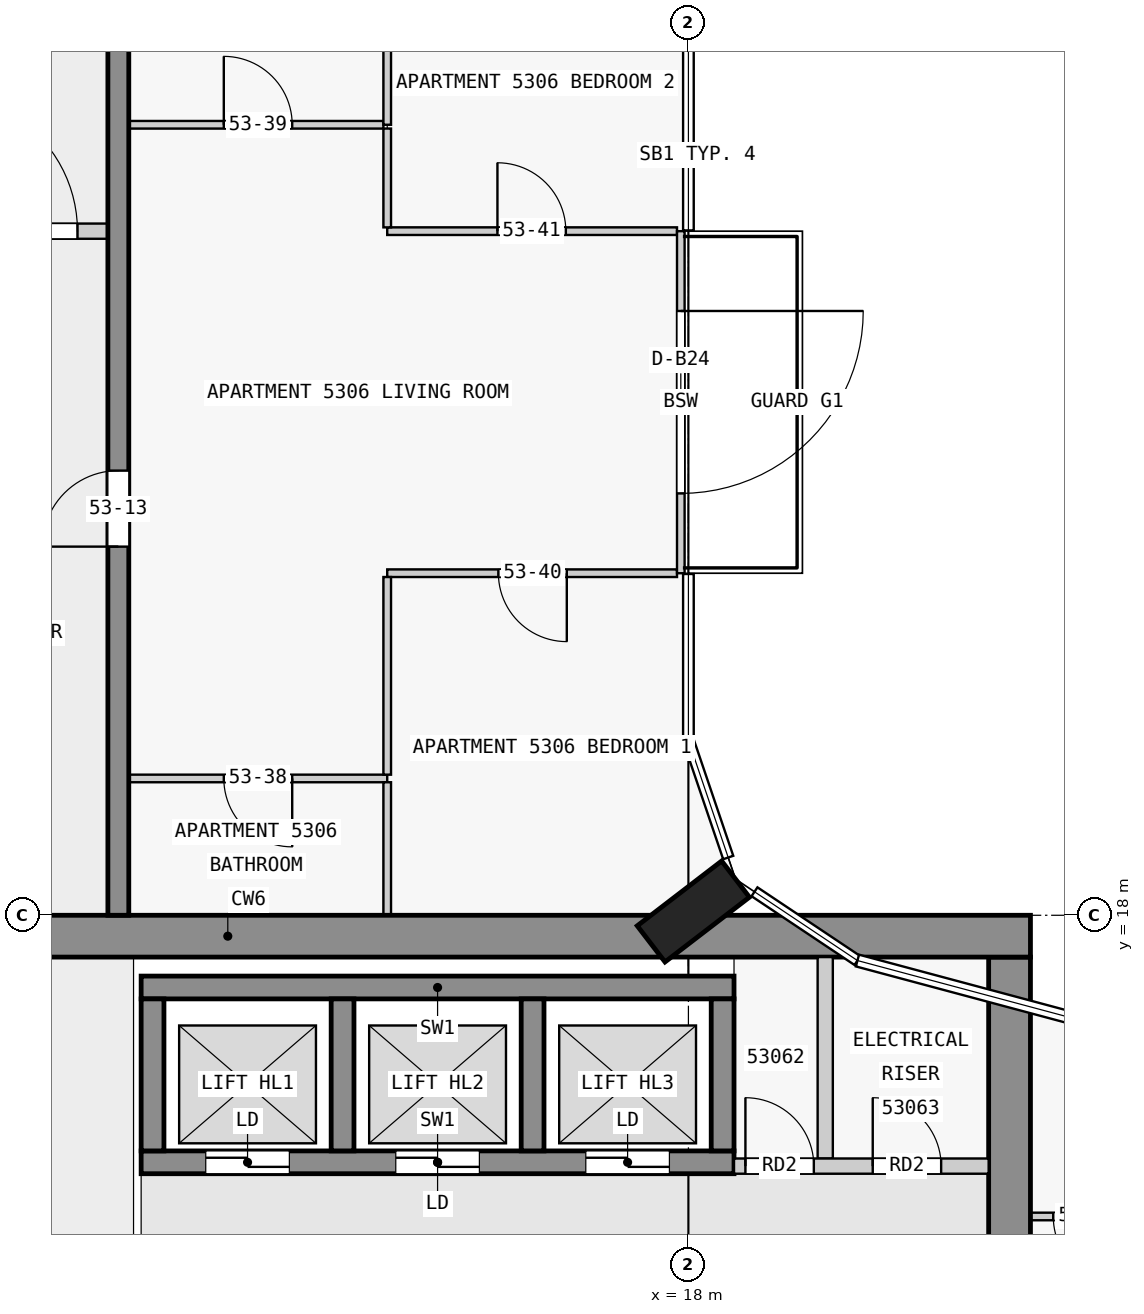
"""IFC4 building model, lengths in metres.
Left out: names, types, materials, properties, quantities, classifications, styles, units other than length and angle.
Written with IfcOpenShell. Run it as: python <this file> out.ifc"""

import sys

from ifc_helpers import new_model, si_unit, direction, frame, frame_2d, origin, origin_2d, place, context, subcontext, project, spatial, rectangle, extrude, element, fill, save


model = new_model("IFC4")
c1 = context("Model", 3, precision=1e-05, world=origin(), true_north=direction((0.0, 1.0)))
c2 = subcontext(c1, "Body", "Model", "MODEL_VIEW")
j1 = project(units=[si_unit("LENGTHUNIT", "METRE"), si_unit("PLANEANGLEUNIT", "RADIAN")], contexts=[c1])
p1 = place(None, origin())
s1 = spatial("IfcSite", under=j1, at=p1, CompositionType="ELEMENT")
p2 = place(p1, origin())
s2 = spatial("IfcBuilding", under=s1, at=p2, CompositionType="ELEMENT")
p3 = place(p2, frame((0.0, 0.0, 204.9)))
s3 = spatial("IfcBuildingStorey", under=s2, at=p3, CompositionType="ELEMENT", Elevation=204.9)
p4 = place(p3, frame((18.065, 18.05, 0.0), z_axis=(0.0, 0.0, 1.0), x_axis=(-0.608810846443, 0.793315418515, 0.0)))
e1 = element("IfcColumn", 1, at=p4, inside=s3, PredefinedType="COLUMN", context=c2, shape_type="SweptSolid", body=[
    extrude(rectangle(XDim=0.6, YDim=1.4, at=origin_2d()), origin(), (0.0, 0.0, 1.0), 3.5),
])
p5 = place(p3, frame((1.38, 17.725, 0.0), z_axis=(0.0, 0.0, 1.0), x_axis=(1.0, 0.0, 0.0)))
e2 = element("IfcWall", 2, at=p5, inside=s3, PredefinedType="SHEAR", context=c2, shape_type="SweptSolid", body=[
    extrude(rectangle(XDim=21.12, YDim=0.55, at=frame_2d((10.56, 0.0))), origin(), (0.0, 0.0, 1.0), 3.25),
])
p6 = place(p5, frame((6.35, 0.0, 0.0)))
e3 = element("IfcOpeningElement", 3, at=p6, cuts=e2, PredefinedType="OPENING", context=c2, shape_type="SweptSolid", body=[
    extrude(rectangle(XDim=1.8, YDim=2.1, at=frame_2d((0.9, 1.05))), frame((0.0, 0.285, 0.0), z_axis=(0.0, -1.0, 0.0), x_axis=(1.0, 0.0, 0.0)), (0.0, 0.0, 1.0), 0.57),
])
p7 = place(p3, frame((22.225, 2.5, 0.0), z_axis=(0.0, 0.0, 1.0), x_axis=(0.0, 1.0, 0.0)))
e4 = element("IfcWall", 4, at=p7, inside=s3, PredefinedType="SHEAR", context=c2, shape_type="SweptSolid", body=[
    extrude(rectangle(XDim=14.95, YDim=0.55, at=frame_2d((7.475, 0.0))), origin(), (0.0, 0.0, 1.0), 3.25),
])
p8 = place(p7, frame((5.6, 0.0, 0.0)))
e5 = element("IfcOpeningElement", 5, at=p8, cuts=e4, PredefinedType="OPENING", context=c2, shape_type="SweptSolid", body=[
    extrude(rectangle(XDim=1.8, YDim=2.1, at=frame_2d((0.9, 1.05))), frame((0.0, 0.285, 0.0), z_axis=(0.0, -1.0, 0.0), x_axis=(1.0, 0.0, 0.0)), (0.0, 0.0, 1.0), 0.57),
])
p9 = place(p3, frame((10.8, 17.05, 0.0), z_axis=(0.0, 0.0, 1.0), x_axis=(1.0, 0.0, 0.0)))
e6 = element("IfcWall", 6, at=p9, inside=s3, PredefinedType="SHEAR", context=c2, shape_type="SweptSolid", body=[
    extrude(rectangle(XDim=7.8, YDim=0.3, at=frame_2d((3.9, 0.0))), origin(), (0.0, 0.0, 1.0), 3.25),
])
p10 = place(p3, frame((10.8, 14.75, 0.0), z_axis=(0.0, 0.0, 1.0), x_axis=(1.0, 0.0, 0.0)))
e7 = element("IfcWall", 7, at=p10, inside=s3, PredefinedType="SHEAR", context=c2, shape_type="SweptSolid", body=[
    extrude(rectangle(XDim=7.8, YDim=0.3, at=frame_2d((3.9, 0.0))), origin(), (0.0, 0.0, 1.0), 3.25),
])
p11 = place(p10, frame((0.85, 0.0, 0.0)))
e8 = element("IfcOpeningElement", 8, at=p11, cuts=e7, PredefinedType="OPENING", context=c2, shape_type="SweptSolid", body=[
    extrude(rectangle(XDim=1.1, YDim=2.1, at=frame_2d((0.55, 1.05))), frame((0.0, 0.16, 0.0), z_axis=(0.0, -1.0, 0.0), x_axis=(1.0, 0.0, 0.0)), (0.0, 0.0, 1.0), 0.32),
])
p12 = place(p10, frame((3.35, 0.0, 0.0)))
e9 = element("IfcOpeningElement", 9, at=p12, cuts=e7, PredefinedType="OPENING", context=c2, shape_type="SweptSolid", body=[
    extrude(rectangle(XDim=1.1, YDim=2.1, at=frame_2d((0.55, 1.05))), frame((0.0, 0.16, 0.0), z_axis=(0.0, -1.0, 0.0), x_axis=(1.0, 0.0, 0.0)), (0.0, 0.0, 1.0), 0.32),
])
p13 = place(p10, frame((5.85, 0.0, 0.0)))
e10 = element("IfcOpeningElement", 10, at=p13, cuts=e7, PredefinedType="OPENING", context=c2, shape_type="SweptSolid", body=[
    extrude(rectangle(XDim=1.1, YDim=2.1, at=frame_2d((0.55, 1.05))), frame((0.0, 0.16, 0.0), z_axis=(0.0, -1.0, 0.0), x_axis=(1.0, 0.0, 0.0)), (0.0, 0.0, 1.0), 0.32),
])
for number, where, z_axis, x_axis in (
    (11, (10.95, 14.9, 0.0), (0.0, 0.0, 1.0), (0.0, 1.0, 0.0)),
    (12, (13.45, 14.9, 0.0), (0.0, 0.0, 1.0), (0.0, 1.0, 0.0)),
    (13, (15.95, 14.9, 0.0), (0.0, 0.0, 1.0), (0.0, 1.0, 0.0)),
    (14, (18.45, 14.9, 0.0), (0.0, 0.0, 1.0), (0.0, 1.0, 0.0)),
):
    element("IfcWall", number, at=place(p3, frame(where, z_axis=z_axis, x_axis=x_axis)), inside=s3, PredefinedType="SHEAR", context=c2, shape_type="SweptSolid", body=[
        extrude(rectangle(XDim=2.0, YDim=0.3, at=frame_2d((1.0, 0.0))), origin(), (0.0, 0.0, 1.0), 3.25),
    ])
p14 = place(p3, frame((10.5, 18.0, 0.0), z_axis=(0.0, 0.0, 1.0), x_axis=(0.0, 1.0, 0.0)))
e15 = element("IfcWall", 15, at=p14, inside=s3, PredefinedType="SHEAR", context=c2, shape_type="SweptSolid", body=[
    extrude(rectangle(XDim=27.0, YDim=0.275, at=frame_2d((13.5, 0.0))), origin(), (0.0, 0.0, 1.0), 3.25),
])
p15 = place(p14, frame((4.85, 0.0, 0.0)))
e16 = element("IfcOpeningElement", 16, at=p15, cuts=e15, PredefinedType="OPENING", context=c2, shape_type="SweptSolid", body=[
    extrude(rectangle(XDim=1.0, YDim=2.1, at=frame_2d((0.5, 1.05))), frame((0.0, 0.147, 0.0), z_axis=(0.0, -1.0, 0.0), x_axis=(1.0, 0.0, 0.0)), (0.0, 0.0, 1.0), 0.295),
])
p16 = place(p14, frame((15.25, 0.0, 0.0)))
e17 = element("IfcOpeningElement", 17, at=p16, cuts=e15, PredefinedType="OPENING", context=c2, shape_type="SweptSolid", body=[
    extrude(rectangle(XDim=1.0, YDim=2.1, at=frame_2d((0.5, 1.05))), frame((0.0, 0.147, 0.0), z_axis=(0.0, -1.0, 0.0), x_axis=(1.0, 0.0, 0.0)), (0.0, 0.0, 1.0), 0.295),
])
p17 = place(p14, frame((21.35, 0.0, 0.0)))
e18 = element("IfcOpeningElement", 18, at=p17, cuts=e15, PredefinedType="OPENING", context=c2, shape_type="SweptSolid", body=[
    extrude(rectangle(XDim=1.0, YDim=2.1, at=frame_2d((0.5, 1.05))), frame((0.0, 0.147, 0.0), z_axis=(0.0, -1.0, 0.0), x_axis=(1.0, 0.0, 0.0)), (0.0, 0.0, 1.0), 0.295),
])
p18 = place(p3, frame((17.9, 27.0, 0.0), z_axis=(0.0, 0.0, 1.0), x_axis=(0.0, -1.0, 0.0)))
e19 = element("IfcWall", 19, at=p18, inside=s3, PredefinedType="STANDARD", context=c2, shape_type="SweptSolid", body=[
    extrude(rectangle(XDim=4.5, YDim=0.1, at=frame_2d((2.25, 0.0))), origin(), (0.0, 0.0, 1.0), 3.25),
])
p19 = place(p18, frame((1.05, 0.0, 0.0)))
e20 = element("IfcOpeningElement", 20, at=p19, cuts=e19, PredefinedType="OPENING", context=c2, shape_type="SweptSolid", body=[
    extrude(rectangle(XDim=2.4, YDim=2.4, at=frame_2d((1.2, 1.2))), frame((0.0, 0.06, 0.0), z_axis=(0.0, -1.0, 0.0), x_axis=(1.0, 0.0, 0.0)), (0.0, 0.0, 1.0), 0.12),
])
p20 = place(p3, frame((18.6, 14.7, 0.0), z_axis=(0.0, 0.0, 1.0), x_axis=(1.0, 0.0, 0.0)))
e21 = element("IfcWall", 21, at=p20, inside=s3, PredefinedType="PARTITIONING", context=c2, shape_type="SweptSolid", body=[
    extrude(rectangle(XDim=3.35, YDim=0.2, at=frame_2d((1.675, 0.0))), origin(), (0.0, 0.0, 1.0), 3.25),
])
p21 = place(p20, frame((0.15, 0.0, 0.0)))
e22 = element("IfcOpeningElement", 22, at=p21, cuts=e21, PredefinedType="OPENING", context=c2, shape_type="SweptSolid", body=[
    extrude(rectangle(XDim=0.9, YDim=2.1, at=frame_2d((0.45, 1.05))), frame((0.0, 0.11, 0.0), z_axis=(0.0, -1.0, 0.0), x_axis=(1.0, 0.0, 0.0)), (0.0, 0.0, 1.0), 0.22),
])
p22 = place(p20, frame((1.825, 0.0, 0.0)))
e23 = element("IfcOpeningElement", 23, at=p22, cuts=e21, PredefinedType="OPENING", context=c2, shape_type="SweptSolid", body=[
    extrude(rectangle(XDim=0.9, YDim=2.1, at=frame_2d((0.45, 1.05))), frame((0.0, 0.11, 0.0), z_axis=(0.0, -1.0, 0.0), x_axis=(1.0, 0.0, 0.0)), (0.0, 0.0, 1.0), 0.22),
])
p23 = place(p3, frame((19.8, 14.8, 0.0), z_axis=(0.0, 0.0, 1.0), x_axis=(0.0, 1.0, 0.0)))
e24 = element("IfcWall", 24, at=p23, inside=s3, PredefinedType="PARTITIONING", context=c2, shape_type="SweptSolid", body=[
    extrude(rectangle(XDim=2.65, YDim=0.2, at=frame_2d((1.325, 0.0))), origin(), (0.0, 0.0, 1.0), 3.25),
])
p24 = place(p3, frame((24.05, 14.038, 0.0), z_axis=(0.0, 0.0, 1.0), x_axis=(-1.0, 0.0, 0.0)))
e25 = element("IfcWall", 25, at=p24, inside=s3, PredefinedType="PARTITIONING", context=c2, shape_type="SweptSolid", body=[
    extrude(rectangle(XDim=1.55, YDim=0.1, at=frame_2d((0.775, 0.0))), origin(), (0.0, 0.0, 1.0), 3.25),
])
p25 = place(p24, frame((0.35, 0.0, 0.0)))
e26 = element("IfcOpeningElement", 26, at=p25, cuts=e25, PredefinedType="OPENING", context=c2, shape_type="SweptSolid", body=[
    extrude(rectangle(XDim=0.9, YDim=2.1, at=frame_2d((0.45, 1.05))), frame((0.0, 0.06, 0.0), z_axis=(0.0, -1.0, 0.0), x_axis=(1.0, 0.0, 0.0)), (0.0, 0.0, 1.0), 0.12),
])
p26 = place(p3, frame((14.038, 19.8, 0.0), z_axis=(0.0, 0.0, 1.0), x_axis=(-1.0, 0.0, 0.0)))
e27 = element("IfcWall", 27, at=p26, inside=s3, PredefinedType="PARTITIONING", context=c2, shape_type="SweptSolid", body=[
    extrude(rectangle(XDim=3.4, YDim=0.1, at=frame_2d((1.7, 0.0))), origin(), (0.0, 0.0, 1.0), 3.25),
])
p27 = place(p26, frame((1.25, 0.0, 0.0)))
e28 = element("IfcOpeningElement", 28, at=p27, cuts=e27, PredefinedType="OPENING", context=c2, shape_type="SweptSolid", body=[
    extrude(rectangle(XDim=0.9, YDim=2.1, at=frame_2d((0.45, 1.05))), frame((0.0, 0.06, 0.0), z_axis=(0.0, -1.0, 0.0), x_axis=(1.0, 0.0, 0.0)), (0.0, 0.0, 1.0), 0.12),
])
p28 = place(p3, frame((17.85, 22.5, 0.0), z_axis=(0.0, 0.0, 1.0), x_axis=(-1.0, 0.0, 0.0)))
e29 = element("IfcWall", 29, at=p28, inside=s3, PredefinedType="PARTITIONING", context=c2, shape_type="SweptSolid", body=[
    extrude(rectangle(XDim=3.812, YDim=0.1, at=frame_2d((1.906, 0.0))), origin(), (0.0, 0.0, 1.0), 3.25),
])
p29 = place(p28, frame((1.45, 0.0, 0.0)))
e30 = element("IfcOpeningElement", 30, at=p29, cuts=e29, PredefinedType="OPENING", context=c2, shape_type="SweptSolid", body=[
    extrude(rectangle(XDim=0.9, YDim=2.1, at=frame_2d((0.45, 1.05))), frame((0.0, 0.06, 0.0), z_axis=(0.0, -1.0, 0.0), x_axis=(1.0, 0.0, 0.0)), (0.0, 0.0, 1.0), 0.12),
])
p30 = place(p3, frame((14.038, 27.0, 0.0), z_axis=(0.0, 0.0, 1.0), x_axis=(1.0, 0.0, 0.0)))
e31 = element("IfcWall", 31, at=p30, inside=s3, PredefinedType="PARTITIONING", context=c2, shape_type="SweptSolid", body=[
    extrude(rectangle(XDim=3.812, YDim=0.1, at=frame_2d((1.906, 0.0))), origin(), (0.0, 0.0, 1.0), 3.25),
])
p31 = place(p30, frame((1.45, 0.0, 0.0)))
e32 = element("IfcOpeningElement", 32, at=p31, cuts=e31, PredefinedType="OPENING", context=c2, shape_type="SweptSolid", body=[
    extrude(rectangle(XDim=0.9, YDim=2.1, at=frame_2d((0.45, 1.05))), frame((0.0, 0.06, 0.0), z_axis=(0.0, -1.0, 0.0), x_axis=(1.0, 0.0, 0.0)), (0.0, 0.0, 1.0), 0.12),
])
p32 = place(p3, frame((10.637, 28.4, 0.0), z_axis=(0.0, 0.0, 1.0), x_axis=(1.0, 0.0, 0.0)))
e33 = element("IfcWall", 33, at=p32, inside=s3, PredefinedType="PARTITIONING", context=c2, shape_type="SweptSolid", body=[
    extrude(rectangle(XDim=3.35, YDim=0.1, at=frame_2d((1.675, 0.0))), origin(), (0.0, 0.0, 1.0), 3.25),
])
p33 = place(p32, frame((1.25, 0.0, 0.0)))
e34 = element("IfcOpeningElement", 34, at=p33, cuts=e33, PredefinedType="OPENING", context=c2, shape_type="SweptSolid", body=[
    extrude(rectangle(XDim=0.9, YDim=2.1, at=frame_2d((0.45, 1.05))), frame((0.0, 0.06, 0.0), z_axis=(0.0, -1.0, 0.0), x_axis=(1.0, 0.0, 0.0)), (0.0, 0.0, 1.0), 0.12),
])
p34 = place(p3, frame((14.038, 22.45, 0.0), z_axis=(0.0, 0.0, 1.0), x_axis=(0.0, -1.0, 0.0)))
e35 = element("IfcWall", 35, at=p34, inside=s3, PredefinedType="PARTITIONING", context=c2, shape_type="SweptSolid", body=[
    extrude(rectangle(XDim=2.6, YDim=0.1, at=frame_2d((1.3, 0.0))), origin(), (0.0, 0.0, 1.0), 3.25),
])
p35 = place(p3, frame((14.038, 28.35, 0.0), z_axis=(0.0, 0.0, 1.0), x_axis=(0.0, -1.0, 0.0)))
e36 = element("IfcWall", 36, at=p35, inside=s3, PredefinedType="PARTITIONING", context=c2, shape_type="SweptSolid", body=[
    extrude(rectangle(XDim=1.3, YDim=0.1, at=frame_2d((0.65, 0.0))), origin(), (0.0, 0.0, 1.0), 3.25),
])
p36 = place(p3, frame((14.038, 18.0, 0.0), z_axis=(0.0, 0.0, 1.0), x_axis=(0.0, 1.0, 0.0)))
e37 = element("IfcWall", 37, at=p36, inside=s3, PredefinedType="PARTITIONING", context=c2, shape_type="SweptSolid", body=[
    extrude(rectangle(XDim=1.75, YDim=0.1, at=frame_2d((0.875, 0.0))), origin(), (0.0, 0.0, 1.0), 3.25),
])
p37 = place(p3, frame((14.038, 28.4, 0.0), z_axis=(0.0, 0.0, 1.0), x_axis=(0.0, 1.0, 0.0)))
e38 = element("IfcWall", 38, at=p37, inside=s3, PredefinedType="PARTITIONING", context=c2, shape_type="SweptSolid", body=[
    extrude(rectangle(XDim=3.0, YDim=0.1, at=frame_2d((1.5, 0.0))), origin(), (0.0, 0.0, 1.0), 3.25),
])
p38 = place(p3, frame((7.462, 27.0, 0.0), z_axis=(0.0, 0.0, 1.0), x_axis=(1.0, 0.0, 0.0)))
e39 = element("IfcWall", 39, at=p38, inside=s3, PredefinedType="PARTITIONING", context=c2, shape_type="SweptSolid", body=[
    extrude(rectangle(XDim=3.175, YDim=0.2, at=frame_2d((1.587, 0.0))), origin(), (0.0, 0.0, 1.0), 3.25),
])
p39 = place(p38, frame((0.7, 0.0, 0.0)))
e40 = element("IfcOpeningElement", 40, at=p39, cuts=e39, PredefinedType="OPENING", context=c2, shape_type="SweptSolid", body=[
    extrude(rectangle(XDim=1.8, YDim=2.1, at=frame_2d((0.9, 1.05))), frame((0.0, 0.11, 0.0), z_axis=(0.0, -1.0, 0.0), x_axis=(1.0, 0.0, 0.0)), (0.0, 0.0, 1.0), 0.22),
])
p40 = place(p19, origin())
e41 = element("IfcDoor", 41, at=p40, inside=s3, OperationType="SINGLE_SWING_LEFT", PredefinedType="DOOR", context=c2, shape_type="SweptSolid", body=[
    extrude(rectangle(XDim=2.4, YDim=2.4, at=frame_2d((1.2, 1.2))), frame((0.0, 0.025, 0.0), z_axis=(0.0, -1.0, 0.0), x_axis=(1.0, 0.0, 0.0)), (0.0, 0.0, 1.0), 0.05),
])
fill(e20, e41)
p41 = place(p11, origin())
e42 = element("IfcDoor", 42, at=p41, inside=s3, OperationType="DOUBLE_DOOR_SLIDING", PredefinedType="DOOR", context=c2, shape_type="SweptSolid", body=[
    extrude(rectangle(XDim=1.1, YDim=2.1, at=frame_2d((0.55, 1.05))), frame((0.0, 0.025, 0.0), z_axis=(0.0, -1.0, 0.0), x_axis=(1.0, 0.0, 0.0)), (0.0, 0.0, 1.0), 0.05),
])
fill(e8, e42)
p42 = place(p12, origin())
e43 = element("IfcDoor", 43, at=p42, inside=s3, OperationType="DOUBLE_DOOR_SLIDING", PredefinedType="DOOR", context=c2, shape_type="SweptSolid", body=[
    extrude(rectangle(XDim=1.1, YDim=2.1, at=frame_2d((0.55, 1.05))), frame((0.0, 0.025, 0.0), z_axis=(0.0, -1.0, 0.0), x_axis=(1.0, 0.0, 0.0)), (0.0, 0.0, 1.0), 0.05),
])
fill(e9, e43)
p43 = place(p13, origin())
e44 = element("IfcDoor", 44, at=p43, inside=s3, OperationType="DOUBLE_DOOR_SLIDING", PredefinedType="DOOR", context=c2, shape_type="SweptSolid", body=[
    extrude(rectangle(XDim=1.1, YDim=2.1, at=frame_2d((0.55, 1.05))), frame((0.0, 0.025, 0.0), z_axis=(0.0, -1.0, 0.0), x_axis=(1.0, 0.0, 0.0)), (0.0, 0.0, 1.0), 0.05),
])
fill(e10, e44)
p44 = place(p21, origin())
e45 = element("IfcDoor", 45, at=p44, inside=s3, OperationType="SINGLE_SWING_LEFT", PredefinedType="DOOR", context=c2, shape_type="SweptSolid", body=[
    extrude(rectangle(XDim=0.9, YDim=2.1, at=frame_2d((0.45, 1.05))), frame((0.0, 0.025, 0.0), z_axis=(0.0, -1.0, 0.0), x_axis=(1.0, 0.0, 0.0)), (0.0, 0.0, 1.0), 0.05),
])
fill(e22, e45)
p45 = place(p22, origin())
e46 = element("IfcDoor", 46, at=p45, inside=s3, OperationType="SINGLE_SWING_LEFT", PredefinedType="DOOR", context=c2, shape_type="SweptSolid", body=[
    extrude(rectangle(XDim=0.9, YDim=2.1, at=frame_2d((0.45, 1.05))), frame((0.0, 0.025, 0.0), z_axis=(0.0, -1.0, 0.0), x_axis=(1.0, 0.0, 0.0)), (0.0, 0.0, 1.0), 0.05),
])
fill(e23, e46)
p46 = place(p15, origin())
e47 = element("IfcDoor", 47, at=p46, inside=s3, OperationType="SINGLE_SWING_LEFT", PredefinedType="DOOR", context=c2, shape_type="SweptSolid", body=[
    extrude(rectangle(XDim=1.0, YDim=2.1, at=frame_2d((0.5, 1.05))), frame((0.0, 0.025, 0.0), z_axis=(0.0, -1.0, 0.0), x_axis=(1.0, 0.0, 0.0)), (0.0, 0.0, 1.0), 0.05),
])
fill(e16, e47)
p47 = place(p39, origin())
e48 = element("IfcDoor", 48, at=p47, inside=s3, OperationType="SINGLE_SWING_RIGHT", PredefinedType="DOOR", context=c2, shape_type="SweptSolid", body=[
    extrude(rectangle(XDim=1.8, YDim=2.1, at=frame_2d((0.9, 1.05))), frame((0.0, 0.025, 0.0), z_axis=(0.0, -1.0, 0.0), x_axis=(1.0, 0.0, 0.0)), (0.0, 0.0, 1.0), 0.05),
])
fill(e40, e48)
p48 = place(p25, origin())
e49 = element("IfcDoor", 49, at=p48, inside=s3, OperationType="SINGLE_SWING_RIGHT", PredefinedType="DOOR", context=c2, shape_type="SweptSolid", body=[
    extrude(rectangle(XDim=0.9, YDim=2.1, at=frame_2d((0.45, 1.05))), frame((0.0, 0.025, 0.0), z_axis=(0.0, -1.0, 0.0), x_axis=(1.0, 0.0, 0.0)), (0.0, 0.0, 1.0), 0.05),
])
fill(e26, e49)
p49 = place(p27, origin())
e50 = element("IfcDoor", 50, at=p49, inside=s3, OperationType="SINGLE_SWING_LEFT", PredefinedType="DOOR", context=c2, shape_type="SweptSolid", body=[
    extrude(rectangle(XDim=0.9, YDim=2.1, at=frame_2d((0.45, 1.05))), frame((0.0, 0.025, 0.0), z_axis=(0.0, -1.0, 0.0), x_axis=(1.0, 0.0, 0.0)), (0.0, 0.0, 1.0), 0.05),
])
fill(e28, e50)
p50 = place(p33, origin())
e51 = element("IfcDoor", 51, at=p50, inside=s3, OperationType="SINGLE_SWING_RIGHT", PredefinedType="DOOR", context=c2, shape_type="SweptSolid", body=[
    extrude(rectangle(XDim=0.9, YDim=2.1, at=frame_2d((0.45, 1.05))), frame((0.0, 0.025, 0.0), z_axis=(0.0, -1.0, 0.0), x_axis=(1.0, 0.0, 0.0)), (0.0, 0.0, 1.0), 0.05),
])
fill(e34, e51)
p51 = place(p29, origin())
e52 = element("IfcDoor", 52, at=p51, inside=s3, OperationType="SINGLE_SWING_LEFT", PredefinedType="DOOR", context=c2, shape_type="SweptSolid", body=[
    extrude(rectangle(XDim=0.9, YDim=2.1, at=frame_2d((0.45, 1.05))), frame((0.0, 0.025, 0.0), z_axis=(0.0, -1.0, 0.0), x_axis=(1.0, 0.0, 0.0)), (0.0, 0.0, 1.0), 0.05),
])
fill(e30, e52)
p52 = place(p31, origin())
e53 = element("IfcDoor", 53, at=p52, inside=s3, OperationType="SINGLE_SWING_LEFT", PredefinedType="DOOR", context=c2, shape_type="SweptSolid", body=[
    extrude(rectangle(XDim=0.9, YDim=2.1, at=frame_2d((0.45, 1.05))), frame((0.0, 0.025, 0.0), z_axis=(0.0, -1.0, 0.0), x_axis=(1.0, 0.0, 0.0)), (0.0, 0.0, 1.0), 0.05),
])
fill(e32, e53)
save(model, sys.argv[1])
